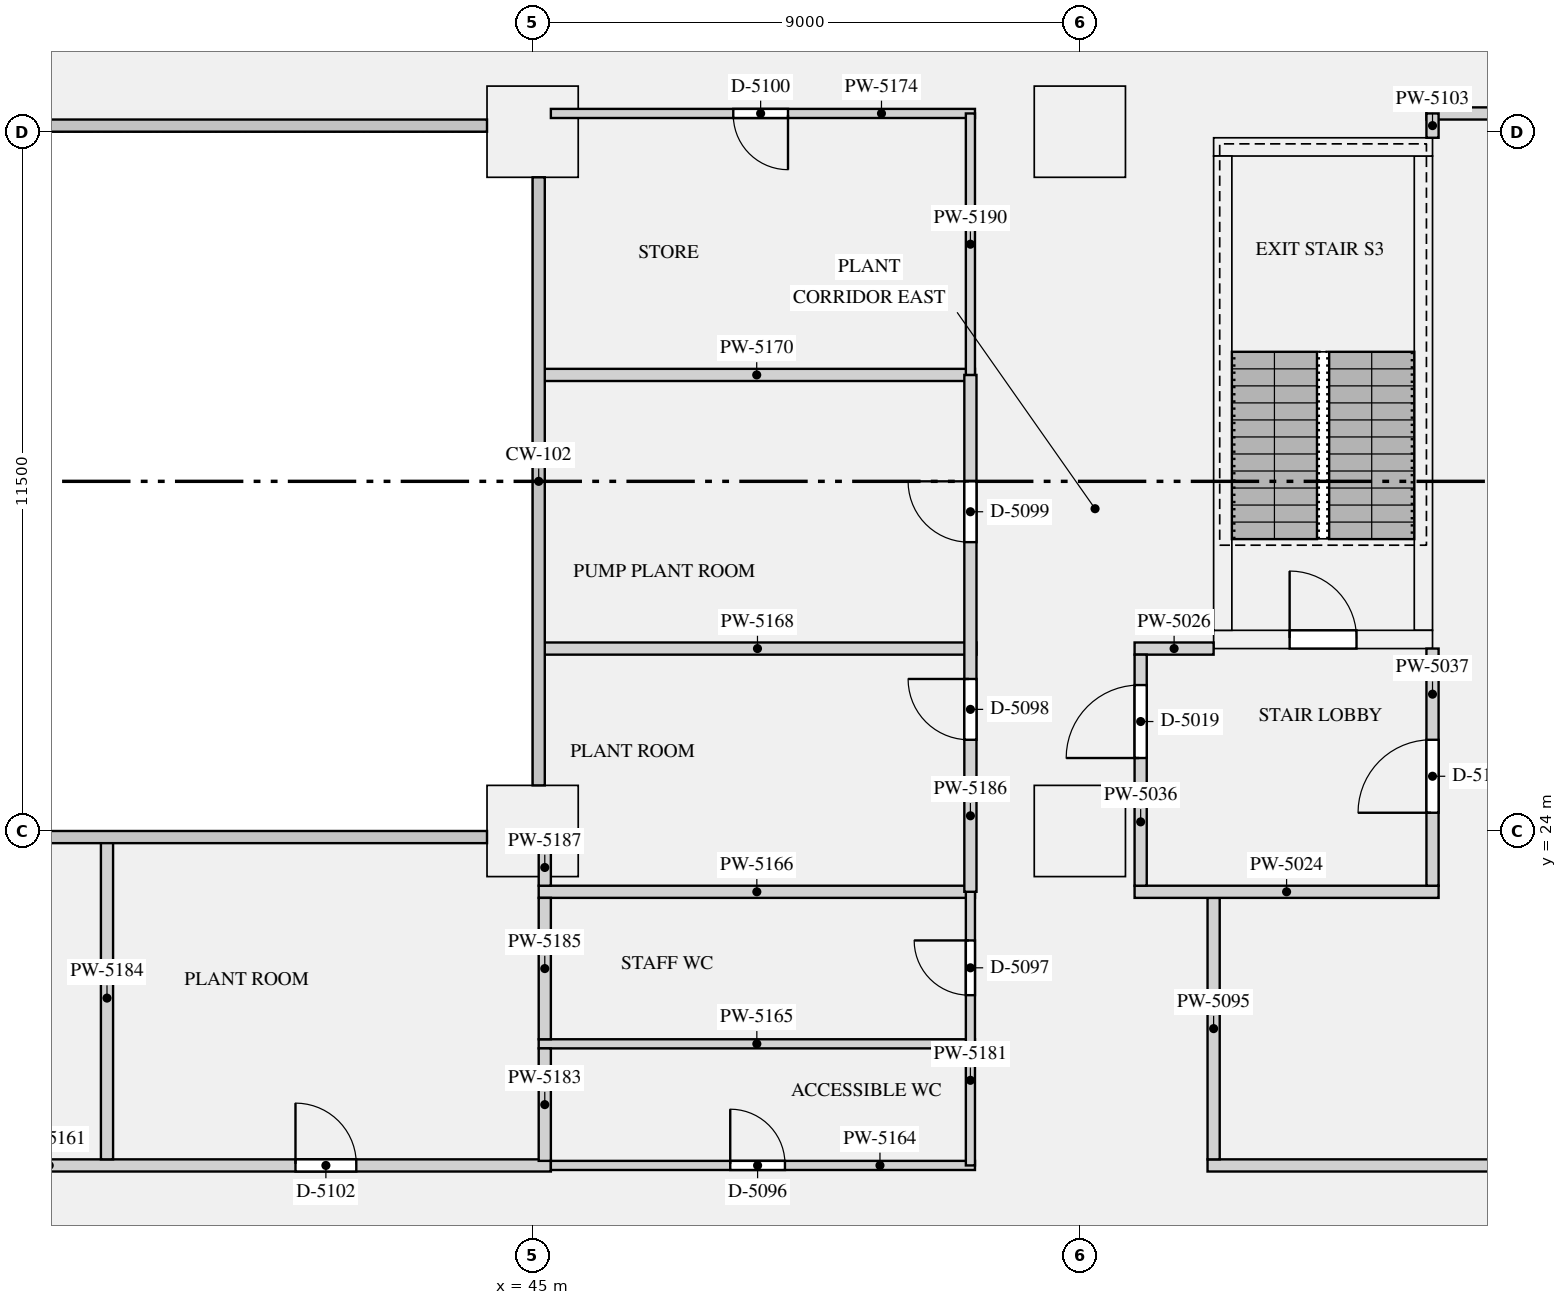
"""IFC4 building model, lengths in metres.
Left out: names, types, materials, properties, quantities, classifications, styles, units other than length and angle.
Written with IfcOpenShell. Run it as: python <this file> out.ifc"""

import sys

from ifc_helpers import new_model, si_unit, direction, frame, frame_2d, origin, origin_2d, place, context, subcontext, project, spatial, rectangle, extrude, element, fill, save


model = new_model("IFC4")
c1 = context("Model", 3, precision=1e-05, world=origin(), true_north=direction((0.0, 1.0)))
c2 = subcontext(c1, "Body", "Model", "MODEL_VIEW")
j1 = project(units=[si_unit("LENGTHUNIT", "METRE"), si_unit("PLANEANGLEUNIT", "RADIAN")], contexts=[c1])
p1 = place(None, origin())
s1 = spatial("IfcSite", under=j1, at=p1, CompositionType="ELEMENT")
p2 = place(p1, origin())
s2 = spatial("IfcBuilding", under=s1, at=p2, CompositionType="ELEMENT")
p3 = place(p2, frame((0.0, 0.0, 73.05)))
s3 = spatial("IfcBuildingStorey", under=s2, at=p3, CompositionType="ELEMENT", Elevation=73.05)
for number, where, z_axis, x_axis in (
    (1, (45.0, 24.0, 0.0), (0.0, 0.0, 1.0), (1.0, 0.0, 0.0)),
    (2, (54.0, 24.0, 0.0), (0.0, 0.0, 1.0), (1.0, 0.0, 0.0)),
    (3, (45.0, 35.5, 0.0), (0.0, 0.0, 1.0), (1.0, 0.0, 0.0)),
    (4, (54.0, 35.5, 0.0), (0.0, 0.0, 1.0), (1.0, 0.0, 0.0)),
):
    element("IfcColumn", number, at=place(p3, frame(where, z_axis=z_axis, x_axis=x_axis)), inside=s3, PredefinedType="COLUMN", context=c2, shape_type="SweptSolid", body=[
        extrude(rectangle(XDim=1.5, YDim=1.5, at=origin_2d()), origin(), (0.0, 0.0, 1.0), 4.2),
    ])
p4 = place(p3, frame((56.2, 27.15, 0.0), z_axis=(0.0, 0.0, 1.0), x_axis=(1.0, 0.0, 0.0)))
e5 = element("IfcWall", 5, at=p4, inside=s3, PredefinedType="SHEAR", context=c2, shape_type="SweptSolid", body=[
    extrude(rectangle(XDim=3.6, YDim=0.3, at=frame_2d((1.8, 0.0))), origin(), (0.0, 0.0, 1.0), 4.2),
])
p5 = place(p4, frame((1.25, 0.0, 0.0)))
e6 = element("IfcOpeningElement", 6, at=p5, cuts=e5, PredefinedType="OPENING", context=c2, shape_type="SweptSolid", body=[
    extrude(rectangle(XDim=1.1, YDim=2.1, at=frame_2d((0.55, 1.05))), frame((0.0, 0.16, 0.0), z_axis=(0.0, -1.0, 0.0), x_axis=(1.0, 0.0, 0.0)), (0.0, 0.0, 1.0), 0.32),
])
p6 = place(p3, frame((56.2, 35.25, 0.0), z_axis=(0.0, 0.0, 1.0), x_axis=(1.0, 0.0, 0.0)))
e7 = element("IfcWall", 7, at=p6, inside=s3, PredefinedType="SHEAR", context=c2, shape_type="SweptSolid", body=[
    extrude(rectangle(XDim=3.6, YDim=0.3, at=frame_2d((1.8, 0.0))), origin(), (0.0, 0.0, 1.0), 4.2),
])
for number, where, z_axis, x_axis in (
    (8, (56.35, 27.3, 0.0), (0.0, 0.0, 1.0), (0.0, 1.0, 0.0)),
    (9, (59.65, 27.3, 0.0), (0.0, 0.0, 1.0), (0.0, 1.0, 0.0)),
):
    element("IfcWall", number, at=place(p3, frame(where, z_axis=z_axis, x_axis=x_axis)), inside=s3, PredefinedType="SHEAR", context=c2, shape_type="SweptSolid", body=[
        extrude(rectangle(XDim=7.8, YDim=0.3, at=frame_2d((3.9, 0.0))), origin(), (0.0, 0.0, 1.0), 4.2),
    ])
p7 = place(p3, frame((54.9, 23.0, 0.0), z_axis=(0.0, 0.0, 1.0), x_axis=(1.0, 0.0, 0.0)))
e10 = element("IfcWall", 10, at=p7, inside=s3, PredefinedType="PARTITIONING", context=c2, shape_type="SweptSolid", body=[
    extrude(rectangle(XDim=5.0, YDim=0.2, at=frame_2d((2.5, 0.0))), origin(), (0.0, 0.0, 1.0), 3.7),
])
p8 = place(p3, frame((54.9, 27.0, 0.0), z_axis=(0.0, 0.0, 1.0), x_axis=(1.0, 0.0, 0.0)))
e11 = element("IfcWall", 11, at=p8, inside=s3, PredefinedType="PARTITIONING", context=c2, shape_type="SweptSolid", body=[
    extrude(rectangle(XDim=1.3, YDim=0.2, at=frame_2d((0.65, 0.0))), origin(), (0.0, 0.0, 1.0), 3.7),
])
p9 = place(p3, frame((55.0, 23.1, 0.0), z_axis=(0.0, 0.0, 1.0), x_axis=(0.0, 1.0, 0.0)))
e12 = element("IfcWall", 12, at=p9, inside=s3, PredefinedType="PARTITIONING", context=c2, shape_type="SweptSolid", body=[
    extrude(rectangle(XDim=3.8, YDim=0.2, at=frame_2d((1.9, 0.0))), origin(), (0.0, 0.0, 1.0), 3.7),
])
p10 = place(p9, frame((2.1, 0.0, 0.0)))
e13 = element("IfcOpeningElement", 13, at=p10, cuts=e12, PredefinedType="OPENING", context=c2, shape_type="SweptSolid", body=[
    extrude(rectangle(XDim=1.2, YDim=2.1, at=frame_2d((0.6, 1.05))), frame((0.0, 0.11, 0.0), z_axis=(0.0, -1.0, 0.0), x_axis=(1.0, 0.0, 0.0)), (0.0, 0.0, 1.0), 0.22),
])
p11 = place(p3, frame((59.8, 23.1, 0.0), z_axis=(0.0, 0.0, 1.0), x_axis=(0.0, 1.0, 0.0)))
e14 = element("IfcWall", 14, at=p11, inside=s3, PredefinedType="PARTITIONING", context=c2, shape_type="SweptSolid", body=[
    extrude(rectangle(XDim=3.9, YDim=0.2, at=frame_2d((1.95, 0.0))), origin(), (0.0, 0.0, 1.0), 3.7),
])
p12 = place(p11, frame((1.2, 0.0, 0.0)))
e15 = element("IfcOpeningElement", 15, at=p12, cuts=e14, PredefinedType="OPENING", context=c2, shape_type="SweptSolid", body=[
    extrude(rectangle(XDim=1.2, YDim=2.1, at=frame_2d((0.6, 1.05))), frame((0.0, 0.11, 0.0), z_axis=(0.0, -1.0, 0.0), x_axis=(1.0, 0.0, 0.0)), (0.0, 0.0, 1.0), 0.22),
])
p13 = place(p3, frame((26.7, 18.5, 0.0), z_axis=(0.0, 0.0, 1.0), x_axis=(1.0, 0.0, 0.0)))
e16 = element("IfcWall", 16, at=p13, inside=s3, PredefinedType="PARTITIONING", context=c2, shape_type="SweptSolid", body=[
    extrude(rectangle(XDim=18.6, YDim=0.2, at=frame_2d((9.3, 0.0))), origin(), (0.0, 0.0, 1.0), 3.7),
])
p14 = place(p13, frame((5.1, 0.0, 0.0)))
e17 = element("IfcOpeningElement", 17, at=p14, cuts=e16, PredefinedType="OPENING", context=c2, shape_type="SweptSolid", body=[
    extrude(rectangle(XDim=1.2, YDim=2.1, at=frame_2d((0.6, 1.05))), frame((0.0, 0.11, 0.0), z_axis=(0.0, -1.0, 0.0), x_axis=(1.0, 0.0, 0.0)), (0.0, 0.0, 1.0), 0.22),
])
p15 = place(p13, frame((14.4, 0.0, 0.0)))
e18 = element("IfcOpeningElement", 18, at=p15, cuts=e16, PredefinedType="OPENING", context=c2, shape_type="SweptSolid", body=[
    extrude(rectangle(XDim=1.0, YDim=2.1, at=frame_2d((0.5, 1.05))), frame((0.0, 0.11, 0.0), z_axis=(0.0, -1.0, 0.0), x_axis=(1.0, 0.0, 0.0)), (0.0, 0.0, 1.0), 0.22),
])
p16 = place(p3, frame((56.1, 18.5, 0.0), z_axis=(0.0, 0.0, 1.0), x_axis=(1.0, 0.0, 0.0)))
e19 = element("IfcWall", 19, at=p16, inside=s3, PredefinedType="PARTITIONING", context=c2, shape_type="SweptSolid", body=[
    extrude(rectangle(XDim=17.81, YDim=0.2, at=frame_2d((8.905, 0.0))), origin(), (0.0, 0.0, 1.0), 3.7),
])
p17 = place(p3, frame((45.3, 18.5, 0.0), z_axis=(0.0, 0.0, 1.0), x_axis=(1.0, 0.0, 0.0)))
e20 = element("IfcWall", 20, at=p17, inside=s3, PredefinedType="PARTITIONING", context=c2, shape_type="SweptSolid", body=[
    extrude(rectangle(XDim=6.975, YDim=0.15, at=frame_2d((3.487, 0.0))), origin(), (0.0, 0.0, 1.0), 3.7),
])
p18 = place(p17, frame((2.95, 0.0, 0.0)))
e21 = element("IfcOpeningElement", 21, at=p18, cuts=e20, PredefinedType="OPENING", context=c2, shape_type="SweptSolid", body=[
    extrude(rectangle(XDim=0.9, YDim=2.1, at=frame_2d((0.45, 1.05))), frame((0.0, 0.085, 0.0), z_axis=(0.0, -1.0, 0.0), x_axis=(1.0, 0.0, 0.0)), (0.0, 0.0, 1.0), 0.17),
])
p19 = place(p3, frame((45.1, 20.5, 0.0), z_axis=(0.0, 0.0, 1.0), x_axis=(1.0, 0.0, 0.0)))
e22 = element("IfcWall", 22, at=p19, inside=s3, PredefinedType="PARTITIONING", context=c2, shape_type="SweptSolid", body=[
    extrude(rectangle(XDim=7.175, YDim=0.15, at=frame_2d((3.587, 0.0))), origin(), (0.0, 0.0, 1.0), 3.7),
])
p20 = place(p3, frame((45.1, 23.0, 0.0), z_axis=(0.0, 0.0, 1.0), x_axis=(1.0, 0.0, 0.0)))
e23 = element("IfcWall", 23, at=p20, inside=s3, PredefinedType="PARTITIONING", context=c2, shape_type="SweptSolid", body=[
    extrude(rectangle(XDim=7.175, YDim=0.2, at=frame_2d((3.587, 0.0))), origin(), (0.0, 0.0, 1.0), 3.7),
])
p21 = place(p3, frame((45.096, 27.0, 0.0), z_axis=(0.0, 0.0, 1.0), x_axis=(1.0, 0.0, 0.0)))
e24 = element("IfcWall", 24, at=p21, inside=s3, PredefinedType="PARTITIONING", context=c2, shape_type="SweptSolid", body=[
    extrude(rectangle(XDim=7.204, YDim=0.2, at=frame_2d((3.602, 0.0))), origin(), (0.0, 0.0, 1.0), 3.7),
])
p22 = place(p3, frame((45.096, 31.5, 0.0), z_axis=(0.0, 0.0, 1.0), x_axis=(1.0, 0.0, 0.0)))
e25 = element("IfcWall", 25, at=p22, inside=s3, PredefinedType="PARTITIONING", context=c2, shape_type="SweptSolid", body=[
    extrude(rectangle(XDim=7.179, YDim=0.2, at=frame_2d((3.589, 0.0))), origin(), (0.0, 0.0, 1.0), 3.7),
])
p23 = place(p3, frame((59.7, 35.8, 0.0), z_axis=(0.0, 0.0, 1.0), x_axis=(1.0, 0.0, 0.0)))
e26 = element("IfcWall", 26, at=p23, inside=s3, PredefinedType="PARTITIONING", context=c2, shape_type="SweptSolid", body=[
    extrude(rectangle(XDim=16.0, YDim=0.2, at=frame_2d((8.0, 0.0))), origin(), (0.0, 0.0, 1.0), 3.7),
])
p24 = place(p3, frame((45.3, 35.8, 0.0), z_axis=(0.0, 0.0, 1.0), x_axis=(1.0, 0.0, 0.0)))
e27 = element("IfcWall", 27, at=p24, inside=s3, PredefinedType="PARTITIONING", context=c2, shape_type="SweptSolid", body=[
    extrude(rectangle(XDim=6.975, YDim=0.15, at=frame_2d((3.487, 0.0))), origin(), (0.0, 0.0, 1.0), 3.7),
])
p25 = place(p24, frame((3.0, 0.0, 0.0)))
e28 = element("IfcOpeningElement", 28, at=p25, cuts=e27, PredefinedType="OPENING", context=c2, shape_type="SweptSolid", body=[
    extrude(rectangle(XDim=0.9, YDim=2.1, at=frame_2d((0.45, 1.05))), frame((0.0, 0.085, 0.0), z_axis=(0.0, -1.0, 0.0), x_axis=(1.0, 0.0, 0.0)), (0.0, 0.0, 1.0), 0.17),
])
p26 = place(p3, frame((52.2, 18.5, 0.0), z_axis=(0.0, 0.0, 1.0), x_axis=(0.0, 1.0, 0.0)))
e29 = element("IfcWall", 29, at=p26, inside=s3, PredefinedType="PARTITIONING", context=c2, shape_type="SweptSolid", body=[
    extrude(rectangle(XDim=4.5, YDim=0.15, at=frame_2d((2.25, 0.0))), origin(), (0.0, 0.0, 1.0), 3.7),
])
p27 = place(p26, frame((2.8, 0.0, 0.0)))
e30 = element("IfcOpeningElement", 30, at=p27, cuts=e29, PredefinedType="OPENING", context=c2, shape_type="SweptSolid", body=[
    extrude(rectangle(XDim=0.9, YDim=2.1, at=frame_2d((0.45, 1.05))), frame((0.0, 0.085, 0.0), z_axis=(0.0, -1.0, 0.0), x_axis=(1.0, 0.0, 0.0)), (0.0, 0.0, 1.0), 0.17),
])
p28 = place(p3, frame((45.2, 18.575, 0.0), z_axis=(0.0, 0.0, 1.0), x_axis=(0.0, 1.0, 0.0)))
e31 = element("IfcWall", 31, at=p28, inside=s3, PredefinedType="PARTITIONING", context=c2, shape_type="SweptSolid", body=[
    extrude(rectangle(XDim=1.85, YDim=0.2, at=frame_2d((0.925, 0.0))), origin(), (0.0, 0.0, 1.0), 3.7),
])
p29 = place(p3, frame((38.0, 18.6, 0.0), z_axis=(0.0, 0.0, 1.0), x_axis=(0.0, 1.0, 0.0)))
e32 = element("IfcWall", 32, at=p29, inside=s3, PredefinedType="PARTITIONING", context=c2, shape_type="SweptSolid", body=[
    extrude(rectangle(XDim=5.304, YDim=0.2, at=frame_2d((2.652, 0.0))), origin(), (0.0, 0.0, 1.0), 3.7),
])
p30 = place(p3, frame((56.2, 18.6, 0.0), z_axis=(0.0, 0.0, 1.0), x_axis=(0.0, 1.0, 0.0)))
e33 = element("IfcWall", 33, at=p30, inside=s3, PredefinedType="PARTITIONING", context=c2, shape_type="SweptSolid", body=[
    extrude(rectangle(XDim=4.3, YDim=0.2, at=frame_2d((2.15, 0.0))), origin(), (0.0, 0.0, 1.0), 3.7),
])
p31 = place(p3, frame((45.2, 20.575, 0.0), z_axis=(0.0, 0.0, 1.0), x_axis=(0.0, 1.0, 0.0)))
e34 = element("IfcWall", 34, at=p31, inside=s3, PredefinedType="PARTITIONING", context=c2, shape_type="SweptSolid", body=[
    extrude(rectangle(XDim=2.325, YDim=0.2, at=frame_2d((1.163, 0.0))), origin(), (0.0, 0.0, 1.0), 3.7),
])
p32 = place(p3, frame((52.2, 23.0, 0.0), z_axis=(0.0, 0.0, 1.0), x_axis=(0.0, 1.0, 0.0)))
e35 = element("IfcWall", 35, at=p32, inside=s3, PredefinedType="PARTITIONING", context=c2, shape_type="SweptSolid", body=[
    extrude(rectangle(XDim=8.5, YDim=0.2, at=frame_2d((4.25, 0.0))), origin(), (0.0, 0.0, 1.0), 3.7),
])
p33 = place(p32, frame((2.5, 0.0, 0.0)))
e36 = element("IfcOpeningElement", 36, at=p33, cuts=e35, PredefinedType="OPENING", context=c2, shape_type="SweptSolid", body=[
    extrude(rectangle(XDim=1.0, YDim=2.1, at=frame_2d((0.5, 1.05))), frame((0.0, 0.11, 0.0), z_axis=(0.0, -1.0, 0.0), x_axis=(1.0, 0.0, 0.0)), (0.0, 0.0, 1.0), 0.22),
])
p34 = place(p32, frame((5.75, 0.0, 0.0)))
e37 = element("IfcOpeningElement", 37, at=p34, cuts=e35, PredefinedType="OPENING", context=c2, shape_type="SweptSolid", body=[
    extrude(rectangle(XDim=1.0, YDim=2.1, at=frame_2d((0.5, 1.05))), frame((0.0, 0.11, 0.0), z_axis=(0.0, -1.0, 0.0), x_axis=(1.0, 0.0, 0.0)), (0.0, 0.0, 1.0), 0.22),
])
p35 = place(p3, frame((45.2, 23.1, 0.0), z_axis=(0.0, 0.0, 1.0), x_axis=(0.0, 1.0, 0.0)))
e38 = element("IfcWall", 38, at=p35, inside=s3, PredefinedType="PARTITIONING", context=c2, shape_type="SweptSolid", body=[
    extrude(rectangle(XDim=0.6, YDim=0.2, at=frame_2d((0.3, 0.0))), origin(), (0.0, 0.0, 1.0), 3.7),
])
p36 = place(p3, frame((52.2, 31.5, 0.0), z_axis=(0.0, 0.0, 1.0), x_axis=(0.0, 1.0, 0.0)))
e39 = element("IfcWall", 39, at=p36, inside=s3, PredefinedType="PARTITIONING", context=c2, shape_type="SweptSolid", body=[
    extrude(rectangle(XDim=4.3, YDim=0.15, at=frame_2d((2.15, 0.0))), origin(), (0.0, 0.0, 1.0), 3.7),
])
p37 = place(p3, frame((59.8, 35.4, 0.0), z_axis=(0.0, 0.0, 1.0), x_axis=(0.0, 1.0, 0.0)))
e40 = element("IfcWall", 40, at=p37, inside=s3, PredefinedType="PARTITIONING", context=c2, shape_type="SweptSolid", body=[
    extrude(rectangle(XDim=0.4, YDim=0.2, at=frame_2d((0.2, 0.0))), origin(), (0.0, 0.0, 1.0), 3.7),
])
p38 = place(p5, origin())
e41 = element("IfcDoor", 41, at=p38, inside=s3, OperationType="SINGLE_SWING_LEFT", PredefinedType="DOOR", context=c2, shape_type="SweptSolid", body=[
    extrude(rectangle(XDim=1.1, YDim=2.1, at=frame_2d((0.55, 1.05))), frame((0.0, 0.025, 0.0), z_axis=(0.0, -1.0, 0.0), x_axis=(1.0, 0.0, 0.0)), (0.0, 0.0, 1.0), 0.05),
])
fill(e6, e41)
p39 = place(p10, origin())
e42 = element("IfcDoor", 42, at=p39, inside=s3, OperationType="SINGLE_SWING_LEFT", PredefinedType="DOOR", context=c2, shape_type="SweptSolid", body=[
    extrude(rectangle(XDim=1.2, YDim=2.1, at=frame_2d((0.6, 1.05))), frame((0.0, 0.025, 0.0), z_axis=(0.0, -1.0, 0.0), x_axis=(1.0, 0.0, 0.0)), (0.0, 0.0, 1.0), 0.05),
])
fill(e13, e42)
p40 = place(p18, origin())
e43 = element("IfcDoor", 43, at=p40, inside=s3, OperationType="SINGLE_SWING_LEFT", PredefinedType="DOOR", context=c2, shape_type="SweptSolid", body=[
    extrude(rectangle(XDim=0.9, YDim=2.1, at=frame_2d((0.45, 1.05))), frame((0.0, 0.025, 0.0), z_axis=(0.0, -1.0, 0.0), x_axis=(1.0, 0.0, 0.0)), (0.0, 0.0, 1.0), 0.05),
])
fill(e21, e43)
p41 = place(p27, origin())
e44 = element("IfcDoor", 44, at=p41, inside=s3, OperationType="SINGLE_SWING_RIGHT", PredefinedType="DOOR", context=c2, shape_type="SweptSolid", body=[
    extrude(rectangle(XDim=0.9, YDim=2.1, at=frame_2d((0.45, 1.05))), frame((0.0, 0.025, 0.0), z_axis=(0.0, -1.0, 0.0), x_axis=(1.0, 0.0, 0.0)), (0.0, 0.0, 1.0), 0.05),
])
fill(e30, e44)
p42 = place(p33, origin())
e45 = element("IfcDoor", 45, at=p42, inside=s3, OperationType="SINGLE_SWING_RIGHT", PredefinedType="DOOR", context=c2, shape_type="SweptSolid", body=[
    extrude(rectangle(XDim=1.0, YDim=2.1, at=frame_2d((0.5, 1.05))), frame((0.0, 0.025, 0.0), z_axis=(0.0, -1.0, 0.0), x_axis=(1.0, 0.0, 0.0)), (0.0, 0.0, 1.0), 0.05),
])
fill(e36, e45)
p43 = place(p34, origin())
e46 = element("IfcDoor", 46, at=p43, inside=s3, OperationType="SINGLE_SWING_RIGHT", PredefinedType="DOOR", context=c2, shape_type="SweptSolid", body=[
    extrude(rectangle(XDim=1.0, YDim=2.1, at=frame_2d((0.5, 1.05))), frame((0.0, 0.025, 0.0), z_axis=(0.0, -1.0, 0.0), x_axis=(1.0, 0.0, 0.0)), (0.0, 0.0, 1.0), 0.05),
])
fill(e37, e46)
p44 = place(p25, frame((0.9, 0.0, 0.0), z_axis=(0.0, 0.0, 1.0), x_axis=(-1.0, 0.0, 0.0)))
e47 = element("IfcDoor", 47, at=p44, inside=s3, OperationType="SINGLE_SWING_LEFT", PredefinedType="DOOR", context=c2, shape_type="SweptSolid", body=[
    extrude(rectangle(XDim=0.9, YDim=2.1, at=frame_2d((0.45, 1.05))), frame((0.0, 0.025, 0.0), z_axis=(0.0, -1.0, 0.0), x_axis=(1.0, 0.0, 0.0)), (0.0, 0.0, 1.0), 0.05),
])
fill(e28, e47)
p45 = place(p15, origin())
e48 = element("IfcDoor", 48, at=p45, inside=s3, OperationType="SINGLE_SWING_LEFT", PredefinedType="DOOR", context=c2, shape_type="SweptSolid", body=[
    extrude(rectangle(XDim=1.0, YDim=2.1, at=frame_2d((0.5, 1.05))), frame((0.0, 0.025, 0.0), z_axis=(0.0, -1.0, 0.0), x_axis=(1.0, 0.0, 0.0)), (0.0, 0.0, 1.0), 0.05),
])
fill(e18, e48)
p46 = place(p12, origin())
e49 = element("IfcDoor", 49, at=p46, inside=s3, OperationType="SINGLE_SWING_LEFT", PredefinedType="DOOR", context=c2, shape_type="SweptSolid", body=[
    extrude(rectangle(XDim=1.2, YDim=2.1, at=frame_2d((0.6, 1.05))), frame((0.0, 0.025, 0.0), z_axis=(0.0, -1.0, 0.0), x_axis=(1.0, 0.0, 0.0)), (0.0, 0.0, 1.0), 0.05),
])
fill(e15, e49)
save(model, sys.argv[1])
